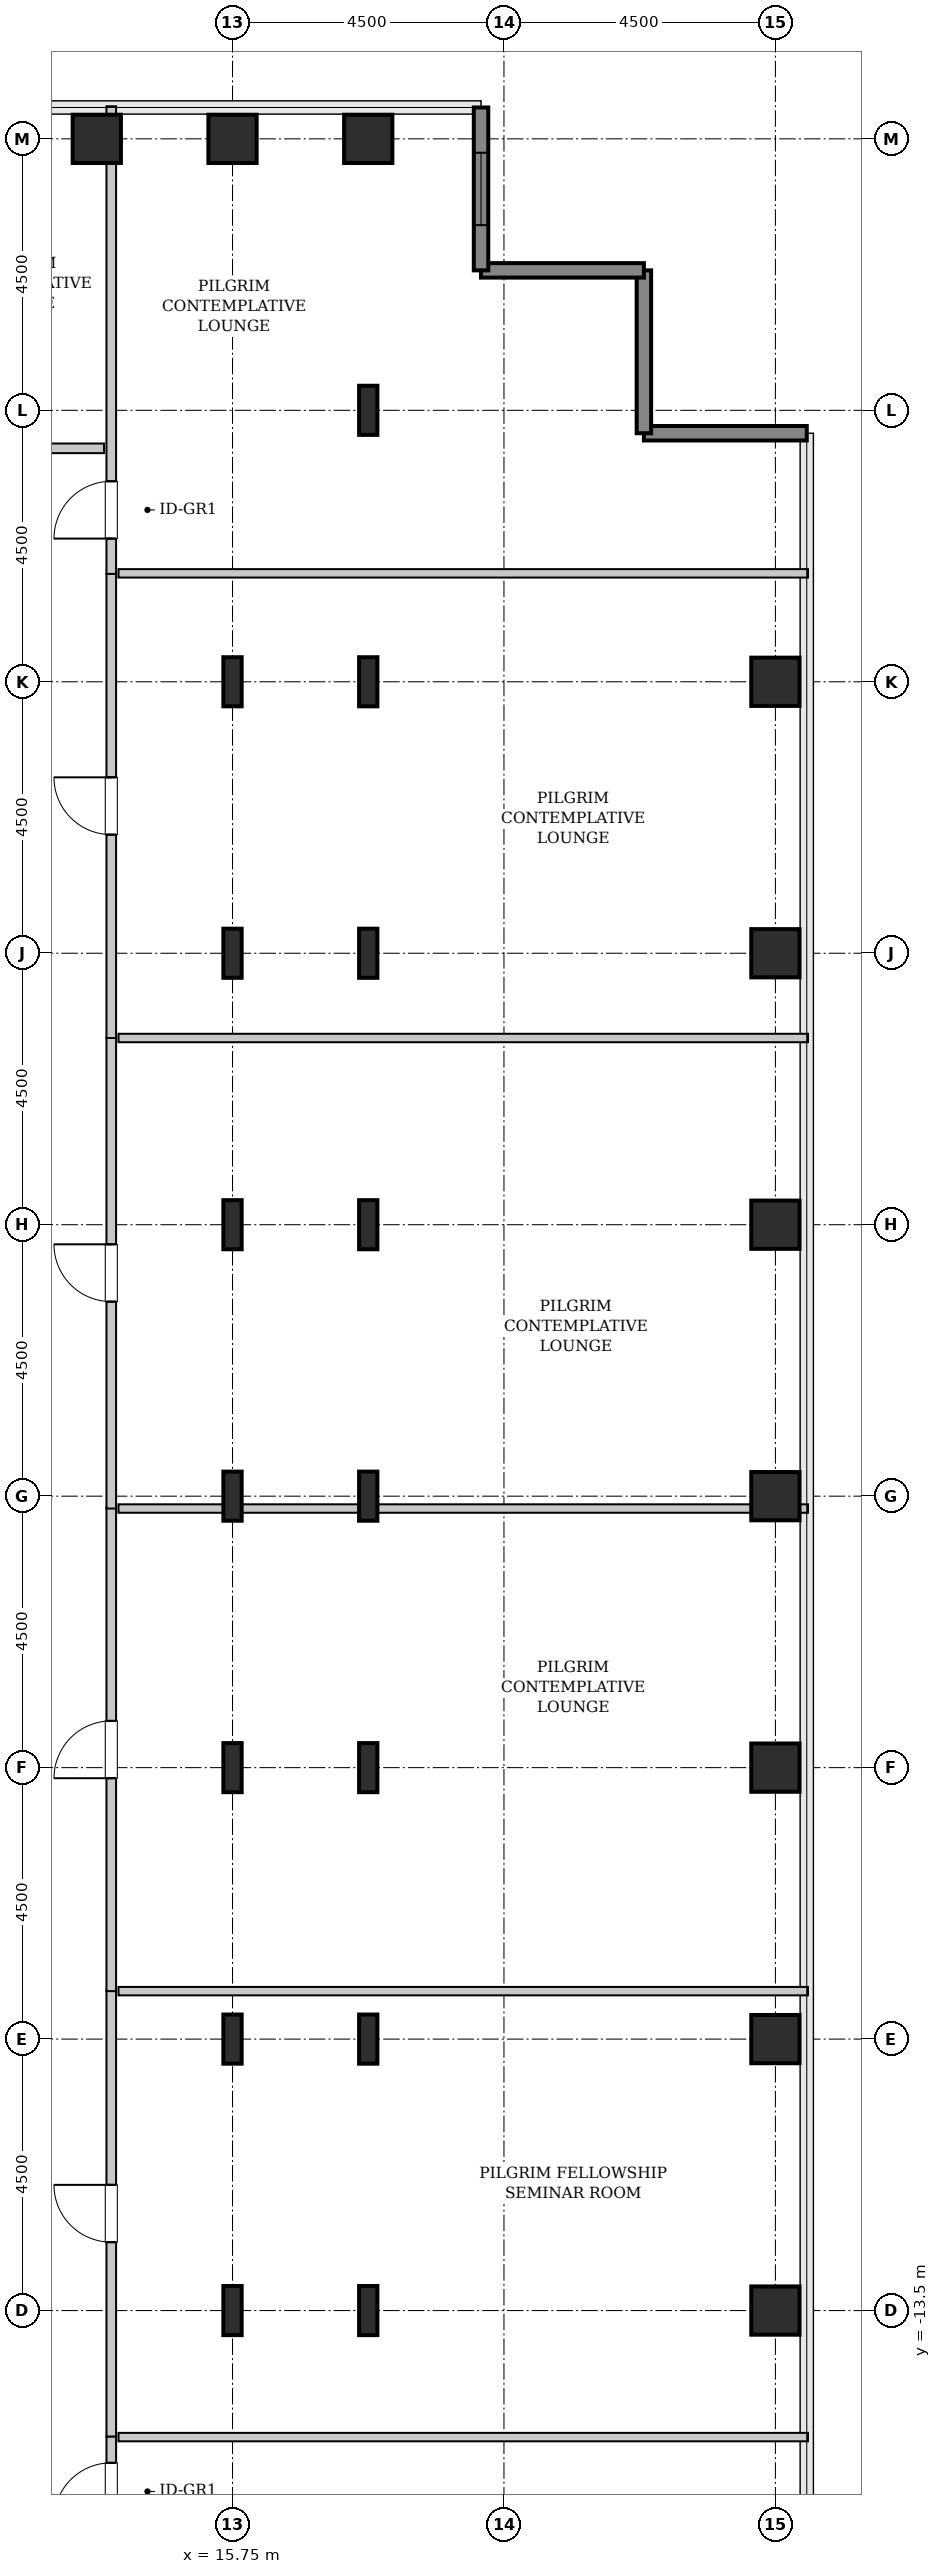
"""IFC4 building model, lengths in metres.
Left out: names, types, materials, properties, quantities, classifications, styles, units other than length and angle.
Written with IfcOpenShell. Run it as: python <this file> out.ifc"""

import sys

from ifc_helpers import new_model, si_unit, direction, frame, frame_2d, origin, origin_2d, place, context, subcontext, project, spatial, rectangle, hollow_rectangle, i_section, extrude, source, transform, mapped, element, fill, save


model = new_model("IFC4")
c1 = context("Model", 3, precision=1e-05, world=origin(), true_north=direction((0.0, 1.0)))
c2 = subcontext(c1, "Body", "Model", "MODEL_VIEW")
j1 = project(units=[si_unit("LENGTHUNIT", "METRE"), si_unit("PLANEANGLEUNIT", "RADIAN")], contexts=[c1])
p1 = place(None, origin())
s1 = spatial("IfcSite", under=j1, at=p1, CompositionType="ELEMENT")
p2 = place(p1, origin())
s2 = spatial("IfcBuilding", under=s1, at=p2, CompositionType="ELEMENT")
p3 = place(p2, frame((0.0, 0.0, 198.2)))
s3 = spatial("IfcBuildingStorey", under=s2, at=p3, CompositionType="ELEMENT", Elevation=198.2)
m1 = source(origin(), c2, "Body", "SweptSolid", [
    extrude(hollow_rectangle(XDim=0.8, YDim=0.8, WallThickness=0.04, InnerFilletRadius=0.04, OuterFilletRadius=0.08, at=origin_2d()), origin(), (0.0, 0.0, 1.0), 3.8),
])
p4 = place(p3, frame((13.5, 22.5, 0.0), z_axis=(0.0, 0.0, 1.0), x_axis=(1.0, 0.0, 0.0)))
e1 = element("IfcColumn", 1, at=p4, inside=s3, PredefinedType="COLUMN", context=c2, shape_type="MappedRepresentation", body=[
    mapped(m1, transform((0.0, 0.0, 0.0), x_axis=(1.0, 0.0, 0.0), y_axis=(0.0, 1.0, 0.0), z_axis=(0.0, 0.0, 1.0), scale=1.0)),
])
m2 = source(origin(), c2, "Body", "SweptSolid", [
    extrude(i_section(OverallWidth=0.303, OverallDepth=0.814, WebThickness=0.021, FlangeThickness=0.04, FilletRadius=0.03, at=origin_2d()), origin(), (0.0, 0.0, 1.0), 3.8),
])
for number, where, z_axis, x_axis in (
    (2, (15.75, -13.5, 0.0), (0.0, 0.0, 1.0), (1.0, 0.0, 0.0)),
    (3, (15.75, -9.0, 0.0), (0.0, 0.0, 1.0), (1.0, 0.0, 0.0)),
    (4, (15.75, -4.5, 0.0), (0.0, 0.0, 1.0), (1.0, 0.0, 0.0)),
    (5, (15.75, 0.0, 0.0), (0.0, 0.0, 1.0), (1.0, 0.0, 0.0)),
    (6, (15.75, 4.5, 0.0), (0.0, 0.0, 1.0), (1.0, 0.0, 0.0)),
    (7, (15.75, 9.0, 0.0), (0.0, 0.0, 1.0), (1.0, 0.0, 0.0)),
    (8, (15.75, 13.5, 0.0), (0.0, 0.0, 1.0), (1.0, 0.0, 0.0)),
):
    element("IfcColumn", number, at=place(p3, frame(where, z_axis=z_axis, x_axis=x_axis)), inside=s3, PredefinedType="COLUMN", context=c2, shape_type="MappedRepresentation", body=[
        mapped(m2, transform((0.0, 0.0, 0.0), x_axis=(1.0, 0.0, 0.0), y_axis=(0.0, 1.0, 0.0), z_axis=(0.0, 0.0, 1.0), scale=1.0)),
    ])
p5 = place(p3, frame((15.75, 22.5, 0.0), z_axis=(0.0, 0.0, 1.0), x_axis=(1.0, 0.0, 0.0)))
e9 = element("IfcColumn", 9, at=p5, inside=s3, PredefinedType="COLUMN", context=c2, shape_type="MappedRepresentation", body=[
    mapped(m1, transform((0.0, 0.0, 0.0), x_axis=(1.0, 0.0, 0.0), y_axis=(0.0, 1.0, 0.0), z_axis=(0.0, 0.0, 1.0), scale=1.0)),
])
for number, where, z_axis, x_axis in (
    (10, (18.0, -13.5, 0.0), (0.0, 0.0, 1.0), (1.0, 0.0, 0.0)),
    (11, (18.0, -9.0, 0.0), (0.0, 0.0, 1.0), (1.0, 0.0, 0.0)),
    (12, (18.0, -4.5, 0.0), (0.0, 0.0, 1.0), (1.0, 0.0, 0.0)),
    (13, (18.0, 0.0, 0.0), (0.0, 0.0, 1.0), (1.0, 0.0, 0.0)),
    (14, (18.0, 4.5, 0.0), (0.0, 0.0, 1.0), (1.0, 0.0, 0.0)),
    (15, (18.0, 9.0, 0.0), (0.0, 0.0, 1.0), (1.0, 0.0, 0.0)),
    (16, (18.0, 13.5, 0.0), (0.0, 0.0, 1.0), (1.0, 0.0, 0.0)),
    (17, (18.0, 18.0, 0.0), (0.0, 0.0, 1.0), (1.0, 0.0, 0.0)),
):
    element("IfcColumn", number, at=place(p3, frame(where, z_axis=z_axis, x_axis=x_axis)), inside=s3, PredefinedType="COLUMN", context=c2, shape_type="MappedRepresentation", body=[
        mapped(m2, transform((0.0, 0.0, 0.0), x_axis=(1.0, 0.0, 0.0), y_axis=(0.0, 1.0, 0.0), z_axis=(0.0, 0.0, 1.0), scale=1.0)),
    ])
for number, where, z_axis, x_axis in (
    (18, (18.0, 22.5, 0.0), (0.0, 0.0, 1.0), (1.0, 0.0, 0.0)),
    (19, (24.75, -13.5, 0.0), (0.0, 0.0, 1.0), (1.0, 0.0, 0.0)),
    (20, (24.75, -9.0, 0.0), (0.0, 0.0, 1.0), (1.0, 0.0, 0.0)),
    (21, (24.75, -4.5, 0.0), (0.0, 0.0, 1.0), (1.0, 0.0, 0.0)),
    (22, (24.75, 0.0, 0.0), (0.0, 0.0, 1.0), (1.0, 0.0, 0.0)),
    (23, (24.75, 4.5, 0.0), (0.0, 0.0, 1.0), (1.0, 0.0, 0.0)),
    (24, (24.75, 9.0, 0.0), (0.0, 0.0, 1.0), (1.0, 0.0, 0.0)),
    (25, (24.75, 13.5, 0.0), (0.0, 0.0, 1.0), (1.0, 0.0, 0.0)),
):
    element("IfcColumn", number, at=place(p3, frame(where, z_axis=z_axis, x_axis=x_axis)), inside=s3, PredefinedType="COLUMN", context=c2, shape_type="MappedRepresentation", body=[
        mapped(m1, transform((0.0, 0.0, 0.0), x_axis=(1.0, 0.0, 0.0), y_axis=(0.0, 1.0, 0.0), z_axis=(0.0, 0.0, 1.0), scale=1.0)),
    ])
m3 = source(origin(), c2, "Body", "SweptSolid", [
    extrude(rectangle(XDim=2.7, YDim=0.24, at=frame_2d((1.35, 0.0))), origin(), (0.0, 0.0, 1.0), 3.5),
])
for number, where, z_axis, x_axis in (
    (26, (25.27, 17.62, 0.0), (0.0, 0.0, 1.0), (-1.0, 0.0, 0.0)),
    (27, (22.57, 17.62, 0.0), (0.0, 0.0, 1.0), (0.0, 1.0, 0.0)),
    (28, (22.57, 20.32, 0.0), (0.0, 0.0, 1.0), (-1.0, 0.0, 0.0)),
):
    element("IfcWall", number, at=place(p3, frame(where, z_axis=z_axis, x_axis=x_axis)), inside=s3, PredefinedType="SHEAR", context=c2, shape_type="MappedRepresentation", body=[
        mapped(m3, transform((0.0, 0.0, 0.0), x_axis=(1.0, 0.0, 0.0), y_axis=(0.0, 1.0, 0.0), z_axis=(0.0, 0.0, 1.0), scale=1.0)),
    ])
p6 = place(p3, frame((19.87, 20.32, 0.0), z_axis=(0.0, 0.0, 1.0), x_axis=(0.0, 1.0, 0.0)))
e29 = element("IfcWall", 29, at=p6, inside=s3, PredefinedType="SHEAR", context=c2, shape_type="MappedRepresentation", body=[
    mapped(m3, transform((0.0, 0.0, 0.0), x_axis=(1.0, 0.0, 0.0), y_axis=(0.0, 1.0, 0.0), z_axis=(0.0, 0.0, 1.0), scale=1.0)),
])
p7 = place(p6, frame((0.75, 0.0, 0.85)))
e30 = element("IfcOpeningElement", 30, at=p7, cuts=e29, PredefinedType="OPENING", context=c2, shape_type="SweptSolid", body=[
    extrude(rectangle(XDim=1.2, YDim=1.8, at=frame_2d((0.6, 0.9))), frame((0.0, 0.13, 0.0), z_axis=(0.0, -1.0, 0.0), x_axis=(1.0, 0.0, 0.0)), (0.0, 0.0, 1.0), 0.26),
])
m4 = source(origin(), c2, "Body", "SweptSolid", [
    extrude(rectangle(XDim=7.453, YDim=0.16, at=frame_2d((3.726, 0.0))), origin(), (0.0, 0.0, 1.0), 3.485),
])
p8 = place(p3, frame((13.74, -23.04, 0.0), z_axis=(0.0, 0.0, 1.0), x_axis=(0.0, 1.0, 0.0)))
e31 = element("IfcWall", 31, at=p8, inside=s3, PredefinedType="PARTITIONING", context=c2, shape_type="MappedRepresentation", body=[
    mapped(m4, transform((0.0, 0.0, 0.0), x_axis=(1.0, 0.0, 0.0), y_axis=(0.0, 1.0, 0.0), z_axis=(0.0, 0.0, 1.0), scale=1.0)),
])
p9 = place(p8, frame((6.066, 0.0, 0.0)))
e32 = element("IfcOpeningElement", 32, at=p9, cuts=e31, PredefinedType="OPENING", context=c2, shape_type="SweptSolid", body=[
    extrude(rectangle(XDim=0.95, YDim=2.1, at=frame_2d((0.475, 1.05))), frame((0.0, 0.09, 0.0), z_axis=(0.0, -1.0, 0.0), x_axis=(1.0, 0.0, 0.0)), (0.0, 0.0, 1.0), 0.18),
])
m5 = source(origin(), c2, "Body", "SweptSolid", [
    extrude(rectangle(XDim=11.43, YDim=0.14, at=frame_2d((5.715, 0.0))), origin(), (0.0, 0.0, 1.0), 3.485),
])
p10 = place(p3, frame((13.86, -15.597, 0.0), z_axis=(0.0, 0.0, 1.0), x_axis=(1.0, 0.0, 0.0)))
e33 = element("IfcWall", 33, at=p10, inside=s3, PredefinedType="PARTITIONING", context=c2, shape_type="MappedRepresentation", body=[
    mapped(m5, transform((0.0, 0.0, 0.0), x_axis=(1.0, 0.0, 0.0), y_axis=(0.0, 1.0, 0.0), z_axis=(0.0, 0.0, 1.0), scale=1.0)),
])
m6 = source(origin(), c2, "Body", "SweptSolid", [
    extrude(rectangle(XDim=7.392, YDim=0.16, at=frame_2d((3.696, 0.0))), origin(), (0.0, 0.0, 1.0), 3.485),
])
p11 = place(p3, frame((13.74, -15.587, 0.0), z_axis=(0.0, 0.0, 1.0), x_axis=(0.0, 1.0, 0.0)))
e34 = element("IfcWall", 34, at=p11, inside=s3, PredefinedType="PARTITIONING", context=c2, shape_type="MappedRepresentation", body=[
    mapped(m6, transform((0.0, 0.0, 0.0), x_axis=(1.0, 0.0, 0.0), y_axis=(0.0, 1.0, 0.0), z_axis=(0.0, 0.0, 1.0), scale=1.0)),
])
p12 = place(p11, frame((3.221, 0.0, 0.0)))
e35 = element("IfcOpeningElement", 35, at=p12, cuts=e34, PredefinedType="OPENING", context=c2, shape_type="SweptSolid", body=[
    extrude(rectangle(XDim=0.95, YDim=2.1, at=frame_2d((0.475, 1.05))), frame((0.0, 0.09, 0.0), z_axis=(0.0, -1.0, 0.0), x_axis=(1.0, 0.0, 0.0)), (0.0, 0.0, 1.0), 0.18),
])
p13 = place(p3, frame((13.86, -8.205, 0.0), z_axis=(0.0, 0.0, 1.0), x_axis=(1.0, 0.0, 0.0)))
e36 = element("IfcWall", 36, at=p13, inside=s3, PredefinedType="PARTITIONING", context=c2, shape_type="MappedRepresentation", body=[
    mapped(m5, transform((0.0, 0.0, 0.0), x_axis=(1.0, 0.0, 0.0), y_axis=(0.0, 1.0, 0.0), z_axis=(0.0, 0.0, 1.0), scale=1.0)),
])
m7 = source(origin(), c2, "Body", "SweptSolid", [
    extrude(rectangle(XDim=8.01, YDim=0.16, at=frame_2d((4.005, 0.0))), origin(), (0.0, 0.0, 1.0), 3.485),
])
p14 = place(p3, frame((13.74, -8.205, 0.0), z_axis=(0.0, 0.0, 1.0), x_axis=(0.0, 1.0, 0.0)))
e37 = element("IfcWall", 37, at=p14, inside=s3, PredefinedType="PARTITIONING", context=c2, shape_type="MappedRepresentation", body=[
    mapped(m7, transform((0.0, 0.0, 0.0), x_axis=(1.0, 0.0, 0.0), y_axis=(0.0, 1.0, 0.0), z_axis=(0.0, 0.0, 1.0), scale=1.0)),
])
p15 = place(p14, frame((3.53, 0.0, 0.0)))
e38 = element("IfcOpeningElement", 38, at=p15, cuts=e37, PredefinedType="OPENING", context=c2, shape_type="SweptSolid", body=[
    extrude(rectangle(XDim=0.95, YDim=2.1, at=frame_2d((0.475, 1.05))), frame((0.0, 0.09, 0.0), z_axis=(0.0, -1.0, 0.0), x_axis=(1.0, 0.0, 0.0)), (0.0, 0.0, 1.0), 0.18),
])
m8 = source(origin(), c2, "Body", "SweptSolid", [
    extrude(rectangle(XDim=11.43, YDim=0.14, at=frame_2d((5.715, 0.0))), origin(), (0.0, 0.0, 1.0), 2.825),
])
p16 = place(p3, frame((13.86, -0.205, 0.0), z_axis=(0.0, 0.0, 1.0), x_axis=(1.0, 0.0, 0.0)))
e39 = element("IfcWall", 39, at=p16, inside=s3, PredefinedType="PARTITIONING", context=c2, shape_type="MappedRepresentation", body=[
    mapped(m8, transform((0.0, 0.0, 0.0), x_axis=(1.0, 0.0, 0.0), y_axis=(0.0, 1.0, 0.0), z_axis=(0.0, 0.0, 1.0), scale=1.0)),
])
m9 = source(origin(), c2, "Body", "SweptSolid", [
    extrude(rectangle(XDim=7.81, YDim=0.16, at=frame_2d((3.905, 0.0))), origin(), (0.0, 0.0, 1.0), 3.485),
])
p17 = place(p3, frame((13.74, -0.205, 0.0), z_axis=(0.0, 0.0, 1.0), x_axis=(0.0, 1.0, 0.0)))
e40 = element("IfcWall", 40, at=p17, inside=s3, PredefinedType="PARTITIONING", context=c2, shape_type="MappedRepresentation", body=[
    mapped(m9, transform((0.0, 0.0, 0.0), x_axis=(1.0, 0.0, 0.0), y_axis=(0.0, 1.0, 0.0), z_axis=(0.0, 0.0, 1.0), scale=1.0)),
])
p18 = place(p17, frame((3.43, 0.0, 0.0)))
e41 = element("IfcOpeningElement", 41, at=p18, cuts=e40, PredefinedType="OPENING", context=c2, shape_type="SweptSolid", body=[
    extrude(rectangle(XDim=0.95, YDim=2.1, at=frame_2d((0.475, 1.05))), frame((0.0, 0.09, 0.0), z_axis=(0.0, -1.0, 0.0), x_axis=(1.0, 0.0, 0.0)), (0.0, 0.0, 1.0), 0.18),
])
p19 = place(p3, frame((13.86, 7.595, 0.0), z_axis=(0.0, 0.0, 1.0), x_axis=(1.0, 0.0, 0.0)))
e42 = element("IfcWall", 42, at=p19, inside=s3, PredefinedType="PARTITIONING", context=c2, shape_type="MappedRepresentation", body=[
    mapped(m5, transform((0.0, 0.0, 0.0), x_axis=(1.0, 0.0, 0.0), y_axis=(0.0, 1.0, 0.0), z_axis=(0.0, 0.0, 1.0), scale=1.0)),
])
m10 = source(origin(), c2, "Body", "SweptSolid", [
    extrude(rectangle(XDim=7.752, YDim=0.16, at=frame_2d((3.876, 0.0))), origin(), (0.0, 0.0, 1.0), 3.485),
])
p20 = place(p3, frame((13.74, 15.288, 0.0), z_axis=(0.0, 0.0, 1.0), x_axis=(0.0, 1.0, 0.0)))
e43 = element("IfcWall", 43, at=p20, inside=s3, PredefinedType="PARTITIONING", context=c2, shape_type="MappedRepresentation", body=[
    mapped(m10, transform((0.0, 0.0, 0.0), x_axis=(1.0, 0.0, 0.0), y_axis=(0.0, 1.0, 0.0), z_axis=(0.0, 0.0, 1.0), scale=1.0)),
])
p21 = place(p20, frame((0.586, 0.0, 0.0)))
e44 = element("IfcOpeningElement", 44, at=p21, cuts=e43, PredefinedType="OPENING", context=c2, shape_type="SweptSolid", body=[
    extrude(rectangle(XDim=0.95, YDim=2.1, at=frame_2d((0.475, 1.05))), frame((0.0, 0.09, 0.0), z_axis=(0.0, -1.0, 0.0), x_axis=(1.0, 0.0, 0.0)), (0.0, 0.0, 1.0), 0.18),
])
p22 = place(p3, frame((13.86, 15.298, 0.0), z_axis=(0.0, 0.0, 1.0), x_axis=(1.0, 0.0, 0.0)))
e45 = element("IfcWall", 45, at=p22, inside=s3, PredefinedType="PARTITIONING", context=c2, shape_type="MappedRepresentation", body=[
    mapped(m5, transform((0.0, 0.0, 0.0), x_axis=(1.0, 0.0, 0.0), y_axis=(0.0, 1.0, 0.0), z_axis=(0.0, 0.0, 1.0), scale=1.0)),
])
m11 = source(origin(), c2, "Body", "SweptSolid", [
    extrude(rectangle(XDim=7.693, YDim=0.16, at=frame_2d((3.846, 0.0))), origin(), (0.0, 0.0, 1.0), 3.485),
])
p23 = place(p3, frame((13.74, 7.595, 0.0), z_axis=(0.0, 0.0, 1.0), x_axis=(0.0, 1.0, 0.0)))
e46 = element("IfcWall", 46, at=p23, inside=s3, PredefinedType="PARTITIONING", context=c2, shape_type="MappedRepresentation", body=[
    mapped(m11, transform((0.0, 0.0, 0.0), x_axis=(1.0, 0.0, 0.0), y_axis=(0.0, 1.0, 0.0), z_axis=(0.0, 0.0, 1.0), scale=1.0)),
])
p24 = place(p23, frame((3.371, 0.0, 0.0)))
e47 = element("IfcOpeningElement", 47, at=p24, cuts=e46, PredefinedType="OPENING", context=c2, shape_type="SweptSolid", body=[
    extrude(rectangle(XDim=0.95, YDim=2.1, at=frame_2d((0.475, 1.05))), frame((0.0, 0.09, 0.0), z_axis=(0.0, -1.0, 0.0), x_axis=(1.0, 0.0, 0.0)), (0.0, 0.0, 1.0), 0.18),
])
m12 = source(origin(), c2, "Body", "SweptSolid", [
    extrude(rectangle(XDim=9.825, YDim=0.16, at=frame_2d((4.913, 0.0))), origin(), (0.0, 0.0, 1.0), 3.485),
])
p25 = place(p3, frame((3.795, 17.37, 0.0), z_axis=(0.0, 0.0, 1.0), x_axis=(1.0, 0.0, 0.0)))
e48 = element("IfcWall", 48, at=p25, inside=s3, PredefinedType="PARTITIONING", context=c2, shape_type="MappedRepresentation", body=[
    mapped(m12, transform((0.0, 0.0, 0.0), x_axis=(1.0, 0.0, 0.0), y_axis=(0.0, 1.0, 0.0), z_axis=(0.0, 0.0, 1.0), scale=1.0)),
])
p26 = place(p25, frame((4.438, 0.0, 0.0)))
e49 = element("IfcOpeningElement", 49, at=p26, cuts=e48, PredefinedType="OPENING", context=c2, shape_type="SweptSolid", body=[
    extrude(rectangle(XDim=0.95, YDim=2.1, at=frame_2d((0.475, 1.05))), frame((0.0, 0.09, 0.0), z_axis=(0.0, -1.0, 0.0), x_axis=(1.0, 0.0, 0.0)), (0.0, 0.0, 1.0), 0.18),
])
m13 = source(origin(), c2, "Body", "SweptSolid", [
    extrude(rectangle(XDim=1.2, YDim=1.8, at=frame_2d((0.6, 0.9))), frame((0.0, 0.03, 0.0), z_axis=(0.0, -1.0, 0.0), x_axis=(1.0, 0.0, 0.0)), (0.0, 0.0, 1.0), 0.06),
])
p27 = place(p7, origin())
e50 = element("IfcWindow", 50, at=p27, inside=s3, PartitioningType="SINGLE_PANEL", PredefinedType="WINDOW", context=c2, shape_type="MappedRepresentation", body=[
    mapped(m13, transform((0.0, 0.0, 0.0), x_axis=(1.0, 0.0, 0.0), y_axis=(0.0, 1.0, 0.0), z_axis=(0.0, 0.0, 1.0), scale=1.0)),
])
fill(e30, e50)
m14 = source(origin(), c2, "Body", "SweptSolid", [
    extrude(rectangle(XDim=0.95, YDim=2.1, at=frame_2d((0.475, 1.05))), frame((0.0, 0.025, 0.0), z_axis=(0.0, -1.0, 0.0), x_axis=(1.0, 0.0, 0.0)), (0.0, 0.0, 1.0), 0.05),
])
p28 = place(p9, origin())
e51 = element("IfcDoor", 51, at=p28, inside=s3, OperationType="SINGLE_SWING_LEFT", PredefinedType="DOOR", context=c2, shape_type="MappedRepresentation", body=[
    mapped(m14, transform((0.0, 0.0, 0.0), x_axis=(1.0, 0.0, 0.0), y_axis=(0.0, 1.0, 0.0), z_axis=(0.0, 0.0, 1.0), scale=1.0)),
])
fill(e32, e51)
p29 = place(p12, origin())
e52 = element("IfcDoor", 52, at=p29, inside=s3, OperationType="SINGLE_SWING_RIGHT", PredefinedType="DOOR", context=c2, shape_type="MappedRepresentation", body=[
    mapped(m14, transform((0.0, 0.0, 0.0), x_axis=(1.0, 0.0, 0.0), y_axis=(0.0, 1.0, 0.0), z_axis=(0.0, 0.0, 1.0), scale=1.0)),
])
fill(e35, e52)
p30 = place(p15, origin())
e53 = element("IfcDoor", 53, at=p30, inside=s3, OperationType="SINGLE_SWING_LEFT", PredefinedType="DOOR", context=c2, shape_type="MappedRepresentation", body=[
    mapped(m14, transform((0.0, 0.0, 0.0), x_axis=(1.0, 0.0, 0.0), y_axis=(0.0, 1.0, 0.0), z_axis=(0.0, 0.0, 1.0), scale=1.0)),
])
fill(e38, e53)
p31 = place(p18, origin())
e54 = element("IfcDoor", 54, at=p31, inside=s3, OperationType="SINGLE_SWING_RIGHT", PredefinedType="DOOR", context=c2, shape_type="MappedRepresentation", body=[
    mapped(m14, transform((0.0, 0.0, 0.0), x_axis=(1.0, 0.0, 0.0), y_axis=(0.0, 1.0, 0.0), z_axis=(0.0, 0.0, 1.0), scale=1.0)),
])
fill(e41, e54)
p32 = place(p21, origin())
e55 = element("IfcDoor", 55, at=p32, inside=s3, OperationType="SINGLE_SWING_LEFT", PredefinedType="DOOR", context=c2, shape_type="MappedRepresentation", body=[
    mapped(m14, transform((0.0, 0.0, 0.0), x_axis=(1.0, 0.0, 0.0), y_axis=(0.0, 1.0, 0.0), z_axis=(0.0, 0.0, 1.0), scale=1.0)),
])
fill(e44, e55)
p33 = place(p24, origin())
e56 = element("IfcDoor", 56, at=p33, inside=s3, OperationType="SINGLE_SWING_RIGHT", PredefinedType="DOOR", context=c2, shape_type="MappedRepresentation", body=[
    mapped(m14, transform((0.0, 0.0, 0.0), x_axis=(1.0, 0.0, 0.0), y_axis=(0.0, 1.0, 0.0), z_axis=(0.0, 0.0, 1.0), scale=1.0)),
])
fill(e47, e56)
save(model, sys.argv[1])
